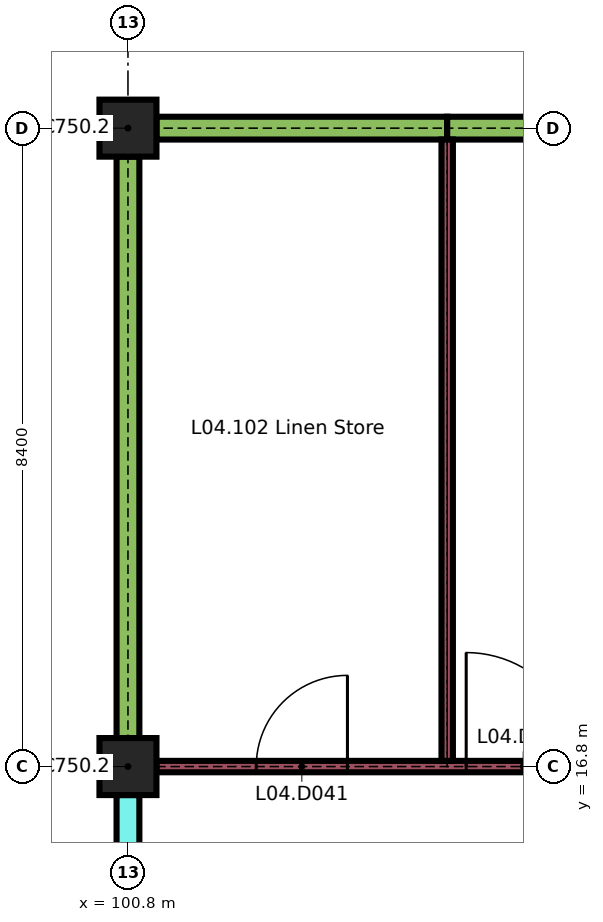
"""IFC4 building model, lengths in metres.
Left out: names, types, materials, properties, quantities, classifications, styles, units other than length and angle.
Written with IfcOpenShell. Run it as: python <this file> out.ifc"""

import sys

from ifc_helpers import new_model, si_unit, direction, frame, frame_2d, origin, origin_2d, place, context, subcontext, project, spatial, rectangle, extrude, element, fill, save


model = new_model("IFC4")
c1 = context("Model", 3, precision=1e-05, world=origin(), true_north=direction((0.0, 1.0)))
c2 = subcontext(c1, "Body", "Model", "MODEL_VIEW")
j1 = project(units=[si_unit("LENGTHUNIT", "METRE"), si_unit("PLANEANGLEUNIT", "RADIAN")], contexts=[c1])
p1 = place(None, origin())
s1 = spatial("IfcSite", under=j1, at=p1, CompositionType="ELEMENT")
p2 = place(p1, origin())
s2 = spatial("IfcBuilding", under=s1, at=p2, CompositionType="ELEMENT")
p3 = place(p2, frame((0.0, 0.0, 18.9)))
s3 = spatial("IfcBuildingStorey", under=s2, at=p3, CompositionType="ELEMENT", Elevation=18.9)
for number, where, z_axis, x_axis in (
    (1, (100.8, 16.8, 0.0), (0.0, 0.0, 1.0), (1.0, 0.0, 0.0)),
    (2, (100.8, 25.2, 0.0), (0.0, 0.0, 1.0), (1.0, 0.0, 0.0)),
):
    element("IfcColumn", number, at=place(p3, frame(where, z_axis=z_axis, x_axis=x_axis)), inside=s3, PredefinedType="COLUMN", context=c2, shape_type="SweptSolid", body=[
        extrude(rectangle(XDim=0.75, YDim=0.75, at=origin_2d()), origin(), (0.0, 0.0, 1.0), 3.26),
    ])
p4 = place(p3, frame((101.175, 25.2, 0.0), z_axis=(0.0, 0.0, 1.0), x_axis=(1.0, 0.0, 0.0)))
e3 = element("IfcWall", 3, at=p4, inside=s3, PredefinedType="SOLIDWALL", context=c2, shape_type="SweptSolid", body=[
    extrude(rectangle(XDim=3.825, YDim=0.3, at=frame_2d((1.913, 0.0))), origin(), (0.0, 0.0, 1.0), 2.96),
])
p5 = place(p3, frame((105.0, 25.2, 0.0), z_axis=(0.0, 0.0, 1.0), x_axis=(1.0, 0.0, 0.0)))
e4 = element("IfcWall", 4, at=p5, inside=s3, PredefinedType="SOLIDWALL", context=c2, shape_type="SweptSolid", body=[
    extrude(rectangle(XDim=3.825, YDim=0.3, at=frame_2d((1.913, 0.0))), origin(), (0.0, 0.0, 1.0), 2.96),
])
p6 = place(p5, frame((1.05, 0.0, 0.9)))
e5 = element("IfcOpeningElement", 5, at=p6, cuts=e4, PredefinedType="OPENING", context=c2, shape_type="SweptSolid", body=[
    extrude(rectangle(XDim=2.1, YDim=1.5, at=frame_2d((1.05, 0.75))), frame((0.0, 0.16, 0.0), z_axis=(0.0, -1.0, 0.0), x_axis=(1.0, 0.0, 0.0)), (0.0, 0.0, 1.0), 0.32),
])
p7 = place(p3, frame((100.8, 13.8, 0.0), z_axis=(0.0, 0.0, 1.0), x_axis=(0.0, 1.0, 0.0)))
e6 = element("IfcWall", 6, at=p7, inside=s3, PredefinedType="SOLIDWALL", context=c2, shape_type="SweptSolid", body=[
    extrude(rectangle(XDim=2.625, YDim=0.3, at=frame_2d((1.312, 0.0))), origin(), (0.0, 0.0, 1.0), 3.26),
])
p8 = place(p3, frame((100.8, 17.175, 0.0), z_axis=(0.0, 0.0, 1.0), x_axis=(0.0, 1.0, 0.0)))
e7 = element("IfcWall", 7, at=p8, inside=s3, PredefinedType="SOLIDWALL", context=c2, shape_type="SweptSolid", body=[
    extrude(rectangle(XDim=7.65, YDim=0.3, at=frame_2d((3.825, 0.0))), origin(), (0.0, 0.0, 1.0), 2.96),
])
p9 = place(p3, frame((101.175, 16.8, 0.0), z_axis=(0.0, 0.0, 1.0), x_axis=(1.0, 0.0, 0.0)))
e8 = element("IfcWall", 8, at=p9, inside=s3, PredefinedType="PARTITIONING", context=c2, shape_type="SweptSolid", body=[
    extrude(rectangle(XDim=7.65, YDim=0.15, at=frame_2d((3.825, 0.0))), origin(), (0.0, 0.0, 1.0), 3.26),
])
p10 = place(p9, frame((1.312, 0.0, 0.0)))
e9 = element("IfcOpeningElement", 9, at=p10, cuts=e8, PredefinedType="OPENING", context=c2, shape_type="SweptSolid", body=[
    extrude(rectangle(XDim=1.2, YDim=2.1, at=frame_2d((0.6, 1.05))), frame((0.0, 0.085, 0.0), z_axis=(0.0, -1.0, 0.0), x_axis=(1.0, 0.0, 0.0)), (0.0, 0.0, 1.0), 0.17),
])
p11 = place(p9, frame((4.075, 0.0, 0.0)))
e10 = element("IfcOpeningElement", 10, at=p11, cuts=e8, PredefinedType="OPENING", context=c2, shape_type="SweptSolid", body=[
    extrude(rectangle(XDim=1.5, YDim=2.4, at=frame_2d((0.75, 1.2))), frame((0.0, 0.085, 0.0), z_axis=(0.0, -1.0, 0.0), x_axis=(1.0, 0.0, 0.0)), (0.0, 0.0, 1.0), 0.17),
])
p12 = place(p3, frame((105.0, 16.875, 0.0), z_axis=(0.0, 0.0, 1.0), x_axis=(0.0, 1.0, 0.0)))
e11 = element("IfcWall", 11, at=p12, inside=s3, PredefinedType="PARTITIONING", context=c2, shape_type="SweptSolid", body=[
    extrude(rectangle(XDim=8.175, YDim=0.15, at=frame_2d((4.087, 0.0))), origin(), (0.0, 0.0, 1.0), 3.26),
])
p13 = place(p10, origin())
e12 = element("IfcDoor", 12, at=p13, inside=s3, OperationType="SINGLE_SWING_LEFT", PredefinedType="DOOR", context=c2, shape_type="SweptSolid", body=[
    extrude(rectangle(XDim=1.2, YDim=2.1, at=frame_2d((0.6, 1.05))), frame((0.0, 0.025, 0.0), z_axis=(0.0, -1.0, 0.0), x_axis=(1.0, 0.0, 0.0)), (0.0, 0.0, 1.0), 0.05),
])
fill(e9, e12)
p14 = place(p11, origin())
e13 = element("IfcDoor", 13, at=p14, inside=s3, OperationType="SINGLE_SWING_RIGHT", PredefinedType="DOOR", context=c2, shape_type="SweptSolid", body=[
    extrude(rectangle(XDim=1.5, YDim=2.4, at=frame_2d((0.75, 1.2))), frame((0.0, 0.03, 0.0), z_axis=(0.0, -1.0, 0.0), x_axis=(1.0, 0.0, 0.0)), (0.0, 0.0, 1.0), 0.06),
])
fill(e10, e13)
save(model, sys.argv[1])
